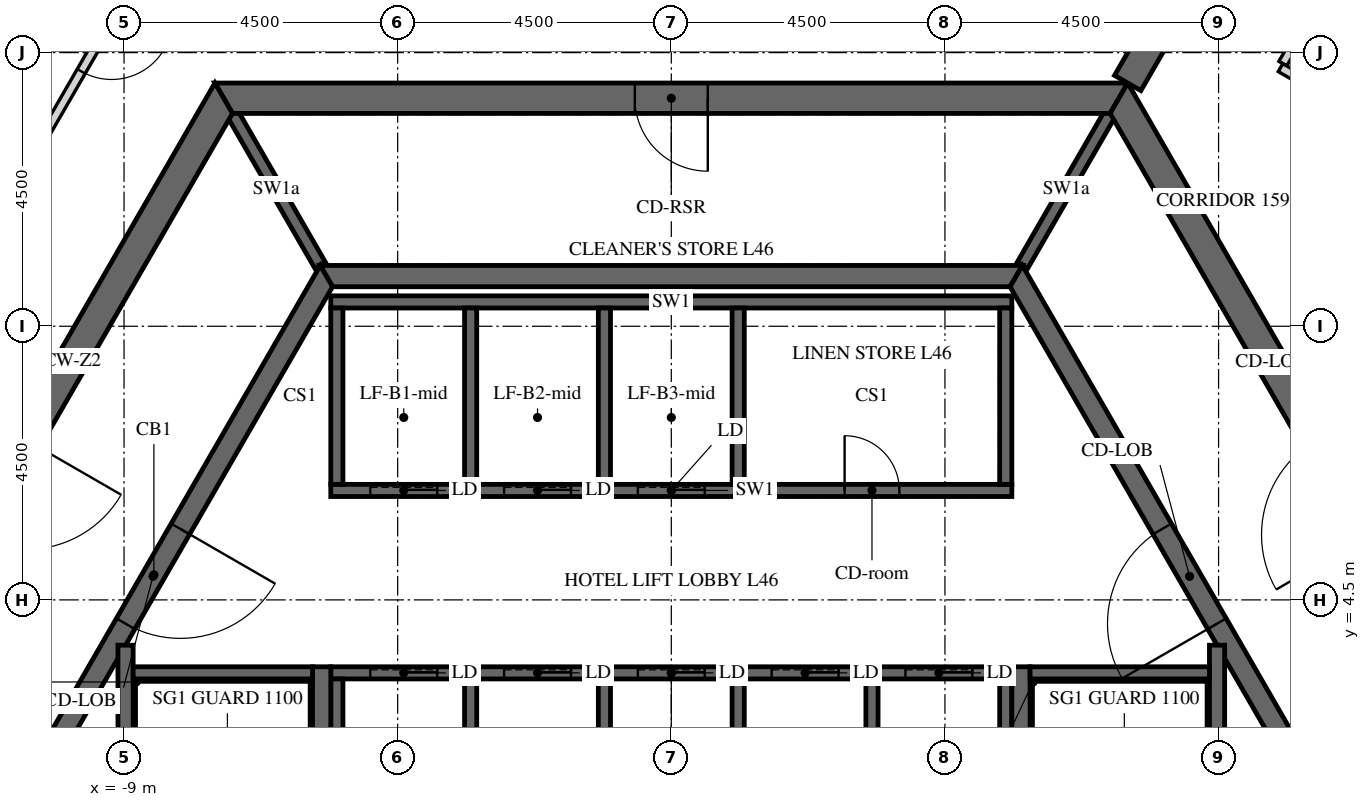
"""IFC4 building model, lengths in metres.
Left out: names, types, materials, properties, quantities, classifications, styles, units other than length and angle.
Written with IfcOpenShell. Run it as: python <this file> out.ifc"""

import sys

from ifc_helpers import new_model, si_unit, direction, frame, frame_2d, origin, place, context, subcontext, project, spatial, polyline, rectangle, outline, extrude, element, fill, save


model = new_model("IFC4")
c1 = context("Model", 3, precision=1e-05, world=origin(), true_north=direction((0.0, 1.0)))
c2 = subcontext(c1, "Body", "Model", "MODEL_VIEW")
j1 = project(units=[si_unit("LENGTHUNIT", "METRE"), si_unit("PLANEANGLEUNIT", "RADIAN")], contexts=[c1])
p1 = place(None, origin())
s1 = spatial("IfcSite", under=j1, at=p1, CompositionType="ELEMENT")
p2 = place(p1, origin())
s2 = spatial("IfcBuilding", under=s1, at=p2, CompositionType="ELEMENT")
p3 = place(p2, frame((0.0, 0.0, 195.6)))
s3 = spatial("IfcBuildingStorey", under=s2, at=p3, CompositionType="ELEMENT", Elevation=195.6)
p4 = place(p3, frame((-7.361, 12.75, -0.15), z_axis=(0.0, 0.0, 1.0), x_axis=(-0.50000571537, -0.866022103989, 0.0)))
e1 = element("IfcWall", 1, at=p4, inside=s3, PredefinedType="SHEAR", context=c2, shape_type="SweptSolid", body=[
    extrude(outline(polyline([(-0.144, -0.25), (14.867, -0.25), (14.578, 0.25), (0.144, 0.25), (-0.144, -0.25)])), origin(), (0.0, 0.0, 1.0), 3.9),
])
p5 = place(p4, frame((6.49, 0.0, 0.15)))
e2 = element("IfcOpeningElement", 2, at=p5, cuts=e1, PredefinedType="OPENING", context=c2, shape_type="SweptSolid", body=[
    extrude(rectangle(XDim=1.8, YDim=2.4, at=frame_2d((0.9, 1.2))), frame((0.0, 0.26, 0.0), z_axis=(0.0, -1.0, 0.0), x_axis=(1.0, 0.0, 0.0)), (0.0, 0.0, 1.0), 0.52),
])
p6 = place(p3, frame((14.722, 0.0, -0.15), z_axis=(0.0, 0.0, 1.0), x_axis=(-0.50000571537, 0.866022103989, 0.0)))
e3 = element("IfcWall", 3, at=p6, inside=s3, PredefinedType="SHEAR", context=c2, shape_type="SweptSolid", body=[
    extrude(outline(polyline([(-0.144, -0.25), (14.867, -0.25), (14.578, 0.25), (0.144, 0.25), (-0.144, -0.25)])), origin(), (0.0, 0.0, 1.0), 3.9),
])
p7 = place(p6, frame((6.432, 0.0, 0.15)))
e4 = element("IfcOpeningElement", 4, at=p7, cuts=e3, PredefinedType="OPENING", context=c2, shape_type="SweptSolid", body=[
    extrude(rectangle(XDim=1.8, YDim=2.4, at=frame_2d((0.9, 1.2))), frame((0.0, 0.26, 0.0), z_axis=(0.0, -1.0, 0.0), x_axis=(1.0, 0.0, 0.0)), (0.0, 0.0, 1.0), 0.52),
])
p8 = place(p3, frame((7.361, 12.75, -0.15), z_axis=(0.0, 0.0, 1.0), x_axis=(-1.0, 0.0, 0.0)))
e5 = element("IfcWall", 5, at=p8, inside=s3, PredefinedType="SHEAR", context=c2, shape_type="SweptSolid", body=[
    extrude(outline(polyline([(-0.144, -0.25), (14.866, -0.25), (14.578, 0.25), (0.144, 0.25), (-0.144, -0.25)])), origin(), (0.0, 0.0, 1.0), 3.9),
])
p9 = place(p8, frame((6.761, 0.0, 0.15)))
e6 = element("IfcOpeningElement", 6, at=p9, cuts=e5, PredefinedType="OPENING", context=c2, shape_type="SweptSolid", body=[
    extrude(rectangle(XDim=1.2, YDim=2.4, at=frame_2d((0.6, 1.2))), frame((0.0, 0.26, 0.0), z_axis=(0.0, -1.0, 0.0), x_axis=(1.0, 0.0, 0.0)), (0.0, 0.0, 1.0), 0.52),
])
p10 = place(p3, frame((7.506, 13.0, -0.15), z_axis=(0.0, 0.0, 1.0), x_axis=(0.499988271576, 0.866032175087, 0.0)))
e7 = element("IfcWall", 7, at=p10, inside=s3, PredefinedType="SHEAR", context=c2, shape_type="SweptSolid", body=[
    extrude(rectangle(XDim=15.424, YDim=0.5, at=frame_2d((7.712, 0.0))), origin(), (0.0, 0.0, 1.0), 3.9),
])
p11 = place(p10, frame((6.812, 0.0, 0.15)))
e8 = element("IfcOpeningElement", 8, at=p11, cuts=e7, PredefinedType="OPENING", context=c2, shape_type="SweptSolid", body=[
    extrude(rectangle(XDim=1.8, YDim=2.4, at=frame_2d((0.9, 1.2))), frame((0.0, 0.26, 0.0), z_axis=(0.0, -1.0, 0.0), x_axis=(1.0, 0.0, 0.0)), (0.0, 0.0, 1.0), 0.52),
])
p12 = place(p3, frame((-5.673, 9.825, -0.15), z_axis=(0.0, 0.0, 1.0), x_axis=(-0.499995046907, -0.866028263435, 0.0)))
e9 = element("IfcWall", 9, at=p12, inside=s3, PredefinedType="SHEAR", context=c2, shape_type="SweptSolid", body=[
    extrude(outline(polyline([(-0.101, -0.175), (11.446, -0.175), (11.244, 0.175), (0.101, 0.175), (-0.101, -0.175)])), origin(), (0.0, 0.0, 1.0), 3.9),
])
p13 = place(p12, frame((4.801, 0.0, 0.15)))
e10 = element("IfcOpeningElement", 10, at=p13, cuts=e9, PredefinedType="OPENING", context=c2, shape_type="SweptSolid", body=[
    extrude(rectangle(XDim=1.8, YDim=2.4, at=frame_2d((0.9, 1.2))), frame((0.0, 0.185, 0.0), z_axis=(0.0, -1.0, 0.0), x_axis=(1.0, 0.0, 0.0)), (0.0, 0.0, 1.0), 0.37),
])
p14 = place(p3, frame((11.345, 0.0, -0.15), z_axis=(0.0, 0.0, 1.0), x_axis=(-0.499995046907, 0.866028263435, 0.0)))
e11 = element("IfcWall", 11, at=p14, inside=s3, PredefinedType="SHEAR", context=c2, shape_type="SweptSolid", body=[
    extrude(outline(polyline([(-0.101, -0.175), (11.446, -0.175), (11.244, 0.175), (0.101, 0.175), (-0.101, -0.175)])), origin(), (0.0, 0.0, 1.0), 3.9),
])
p15 = place(p14, frame((4.744, 0.0, 0.15)))
e12 = element("IfcOpeningElement", 12, at=p15, cuts=e11, PredefinedType="OPENING", context=c2, shape_type="SweptSolid", body=[
    extrude(rectangle(XDim=1.8, YDim=2.4, at=frame_2d((0.9, 1.2))), frame((0.0, 0.185, 0.0), z_axis=(0.0, -1.0, 0.0), x_axis=(1.0, 0.0, 0.0)), (0.0, 0.0, 1.0), 0.37),
])
p16 = place(p3, frame((5.673, 9.825, -0.15), z_axis=(0.0, 0.0, 1.0), x_axis=(-1.0, 0.0, 0.0)))
e13 = element("IfcWall", 13, at=p16, inside=s3, PredefinedType="SHEAR", context=c2, shape_type="SweptSolid", body=[
    extrude(outline(polyline([(-0.101, -0.175), (11.446, -0.175), (11.244, 0.175), (0.101, 0.175), (-0.101, -0.175)])), origin(), (0.0, 0.0, 1.0), 3.9),
])
p17 = place(p3, frame((-5.6, 6.3, -0.25), z_axis=(0.0, 0.0, 1.0), x_axis=(1.0, 0.0, 0.0)))
e14 = element("IfcWall", 14, at=p17, inside=s3, PredefinedType="SHEAR", context=c2, shape_type="SweptSolid", body=[
    extrude(rectangle(XDim=11.2, YDim=0.2, at=frame_2d((5.6, 0.0))), origin(), (0.0, 0.0, 1.0), 3.9),
])
p18 = place(p17, frame((8.45, 0.0, 0.25)))
e15 = element("IfcOpeningElement", 15, at=p18, cuts=e14, PredefinedType="OPENING", context=c2, shape_type="SweptSolid", body=[
    extrude(rectangle(XDim=0.9, YDim=2.1, at=frame_2d((0.45, 1.05))), frame((0.0, 0.11, 0.0), z_axis=(0.0, -1.0, 0.0), x_axis=(1.0, 0.0, 0.0)), (0.0, 0.0, 1.0), 0.22),
])
p19 = place(p17, frame((0.65, 0.0, 0.25)))
e16 = element("IfcOpeningElement", 16, at=p19, cuts=e14, PredefinedType="OPENING", context=c2, shape_type="SweptSolid", body=[
    extrude(rectangle(XDim=1.1, YDim=2.1, at=frame_2d((0.55, 1.05))), frame((0.0, 0.11, 0.0), z_axis=(0.0, -1.0, 0.0), x_axis=(1.0, 0.0, 0.0)), (0.0, 0.0, 1.0), 0.22),
])
p20 = place(p17, frame((2.85, 0.0, 0.25)))
e17 = element("IfcOpeningElement", 17, at=p20, cuts=e14, PredefinedType="OPENING", context=c2, shape_type="SweptSolid", body=[
    extrude(rectangle(XDim=1.1, YDim=2.1, at=frame_2d((0.55, 1.05))), frame((0.0, 0.11, 0.0), z_axis=(0.0, -1.0, 0.0), x_axis=(1.0, 0.0, 0.0)), (0.0, 0.0, 1.0), 0.22),
])
p21 = place(p17, frame((5.05, 0.0, 0.25)))
e18 = element("IfcOpeningElement", 18, at=p21, cuts=e14, PredefinedType="OPENING", context=c2, shape_type="SweptSolid", body=[
    extrude(rectangle(XDim=1.1, YDim=2.1, at=frame_2d((0.55, 1.05))), frame((0.0, 0.11, 0.0), z_axis=(0.0, -1.0, 0.0), x_axis=(1.0, 0.0, 0.0)), (0.0, 0.0, 1.0), 0.22),
])
p22 = place(p3, frame((-5.6, 9.4, -0.25), z_axis=(0.0, 0.0, 1.0), x_axis=(1.0, 0.0, 0.0)))
e19 = element("IfcWall", 19, at=p22, inside=s3, PredefinedType="SHEAR", context=c2, shape_type="SweptSolid", body=[
    extrude(rectangle(XDim=11.2, YDim=0.2, at=frame_2d((5.6, 0.0))), origin(), (0.0, 0.0, 1.0), 3.9),
])
for number, where, z_axis, x_axis in (
    (20, (-5.5, 6.4, -0.25), (0.0, 0.0, 1.0), (0.0, 1.0, 0.0)),
    (21, (-3.3, 6.4, -0.25), (0.0, 0.0, 1.0), (0.0, 1.0, 0.0)),
    (22, (-1.1, 6.4, -0.25), (0.0, 0.0, 1.0), (0.0, 1.0, 0.0)),
    (23, (1.1, 6.4, -0.25), (0.0, 0.0, 1.0), (0.0, 1.0, 0.0)),
    (24, (5.5, 6.4, -0.25), (0.0, 0.0, 1.0), (0.0, 1.0, 0.0)),
):
    element("IfcWall", number, at=place(p3, frame(where, z_axis=z_axis, x_axis=x_axis)), inside=s3, PredefinedType="SHEAR", context=c2, shape_type="SweptSolid", body=[
        extrude(rectangle(XDim=2.9, YDim=0.2, at=frame_2d((1.45, 0.0))), origin(), (0.0, 0.0, 1.0), 3.9),
    ])
p23 = place(p3, frame((-5.6, 3.3, -0.25), z_axis=(0.0, 0.0, 1.0), x_axis=(1.0, 0.0, 0.0)))
e25 = element("IfcWall", 25, at=p23, inside=s3, PredefinedType="SHEAR", context=c2, shape_type="SweptSolid", body=[
    extrude(rectangle(XDim=11.2, YDim=0.2, at=frame_2d((5.6, 0.0))), origin(), (0.0, 0.0, 1.0), 3.9),
])
p24 = place(p23, frame((0.65, 0.0, 0.25)))
e26 = element("IfcOpeningElement", 26, at=p24, cuts=e25, PredefinedType="OPENING", context=c2, shape_type="SweptSolid", body=[
    extrude(rectangle(XDim=1.1, YDim=2.1, at=frame_2d((0.55, 1.05))), frame((0.0, 0.11, 0.0), z_axis=(0.0, -1.0, 0.0), x_axis=(1.0, 0.0, 0.0)), (0.0, 0.0, 1.0), 0.22),
])
p25 = place(p23, frame((2.85, 0.0, 0.25)))
e27 = element("IfcOpeningElement", 27, at=p25, cuts=e25, PredefinedType="OPENING", context=c2, shape_type="SweptSolid", body=[
    extrude(rectangle(XDim=1.1, YDim=2.1, at=frame_2d((0.55, 1.05))), frame((0.0, 0.11, 0.0), z_axis=(0.0, -1.0, 0.0), x_axis=(1.0, 0.0, 0.0)), (0.0, 0.0, 1.0), 0.22),
])
p26 = place(p23, frame((5.05, 0.0, 0.25)))
e28 = element("IfcOpeningElement", 28, at=p26, cuts=e25, PredefinedType="OPENING", context=c2, shape_type="SweptSolid", body=[
    extrude(rectangle(XDim=1.1, YDim=2.1, at=frame_2d((0.55, 1.05))), frame((0.0, 0.11, 0.0), z_axis=(0.0, -1.0, 0.0), x_axis=(1.0, 0.0, 0.0)), (0.0, 0.0, 1.0), 0.22),
])
p27 = place(p23, frame((7.25, 0.0, 0.25)))
e29 = element("IfcOpeningElement", 29, at=p27, cuts=e25, PredefinedType="OPENING", context=c2, shape_type="SweptSolid", body=[
    extrude(rectangle(XDim=1.1, YDim=2.1, at=frame_2d((0.55, 1.05))), frame((0.0, 0.11, 0.0), z_axis=(0.0, -1.0, 0.0), x_axis=(1.0, 0.0, 0.0)), (0.0, 0.0, 1.0), 0.22),
])
p28 = place(p23, frame((9.45, 0.0, 0.25)))
e30 = element("IfcOpeningElement", 30, at=p28, cuts=e25, PredefinedType="OPENING", context=c2, shape_type="SweptSolid", body=[
    extrude(rectangle(XDim=1.1, YDim=2.1, at=frame_2d((0.55, 1.05))), frame((0.0, 0.11, 0.0), z_axis=(0.0, -1.0, 0.0), x_axis=(1.0, 0.0, 0.0)), (0.0, 0.0, 1.0), 0.22),
])
for number, where, z_axis, x_axis in (
    (31, (-5.5, 0.1, -0.25), (0.0, 0.0, 1.0), (0.0, 1.0, 0.0)),
    (32, (-3.3, 0.1, -0.25), (0.0, 0.0, 1.0), (0.0, 1.0, 0.0)),
    (33, (-1.1, 0.1, -0.25), (0.0, 0.0, 1.0), (0.0, 1.0, 0.0)),
    (34, (1.1, 0.1, -0.25), (0.0, 0.0, 1.0), (0.0, 1.0, 0.0)),
    (35, (3.3, 0.1, -0.25), (0.0, 0.0, 1.0), (0.0, 1.0, 0.0)),
    (36, (5.5, 0.1, -0.25), (0.0, 0.0, 1.0), (0.0, 1.0, 0.0)),
):
    element("IfcWall", number, at=place(p3, frame(where, z_axis=z_axis, x_axis=x_axis)), inside=s3, PredefinedType="SHEAR", context=c2, shape_type="SweptSolid", body=[
        extrude(rectangle(XDim=3.1, YDim=0.2, at=frame_2d((1.55, 0.0))), origin(), (0.0, 0.0, 1.0), 3.9),
    ])
for number, where, z_axis, x_axis in (
    (37, (5.773, 10.0, -0.15), (0.0, 0.0, 1.0), (0.5, 0.866, 0.0)),
    (38, (-5.773, 10.0, -0.15), (0.0, 0.0, 1.0), (-0.5, 0.866, 0.0)),
):
    element("IfcWall", number, at=place(p3, frame(where, z_axis=z_axis, x_axis=x_axis)), inside=s3, PredefinedType="SHEAR", context=c2, shape_type="SweptSolid", body=[
        extrude(rectangle(XDim=2.887, YDim=0.2, at=frame_2d((1.443, 0.0))), origin(), (0.0, 0.0, 1.0), 3.9),
    ])
p29 = place(p3, frame((5.75, -3.4, -0.25), z_axis=(0.0, 0.0, 1.0), x_axis=(0.0, 1.0, 0.0)))
e39 = element("IfcWall", 39, at=p29, inside=s3, PredefinedType="SHEAR", context=c2, shape_type="SweptSolid", body=[
    extrude(rectangle(XDim=6.8, YDim=0.3, at=frame_2d((3.4, 0.0))), origin(), (0.0, 0.0, 1.0), 3.9),
])
p30 = place(p3, frame((8.975, -3.755, -0.25), z_axis=(0.0, 0.0, 1.0), x_axis=(0.0, 1.0, 0.0)))
e40 = element("IfcWall", 40, at=p30, inside=s3, PredefinedType="SHEAR", context=c2, shape_type="SweptSolid", body=[
    extrude(rectangle(XDim=7.51, YDim=0.25, at=frame_2d((3.755, 0.0))), origin(), (0.0, 0.0, 1.0), 3.9),
])
p31 = place(p3, frame((5.9, 3.3, -0.25), z_axis=(0.0, 0.0, 1.0), x_axis=(1.0, 0.0, 0.0)))
e41 = element("IfcWall", 41, at=p31, inside=s3, PredefinedType="SHEAR", context=c2, shape_type="SweptSolid", body=[
    extrude(rectangle(XDim=2.95, YDim=0.2, at=frame_2d((1.475, 0.0))), origin(), (0.0, 0.0, 1.0), 3.9),
])
p32 = place(p3, frame((-5.75, -3.4, -0.25), z_axis=(0.0, 0.0, 1.0), x_axis=(0.0, 1.0, 0.0)))
e42 = element("IfcWall", 42, at=p32, inside=s3, PredefinedType="SHEAR", context=c2, shape_type="SweptSolid", body=[
    extrude(rectangle(XDim=6.8, YDim=0.3, at=frame_2d((3.4, 0.0))), origin(), (0.0, 0.0, 1.0), 3.9),
])
p33 = place(p3, frame((-8.975, -3.755, -0.25), z_axis=(0.0, 0.0, 1.0), x_axis=(0.0, 1.0, 0.0)))
e43 = element("IfcWall", 43, at=p33, inside=s3, PredefinedType="SHEAR", context=c2, shape_type="SweptSolid", body=[
    extrude(rectangle(XDim=7.51, YDim=0.25, at=frame_2d((3.755, 0.0))), origin(), (0.0, 0.0, 1.0), 3.9),
])
p34 = place(p3, frame((-8.85, 3.3, -0.25), z_axis=(0.0, 0.0, 1.0), x_axis=(1.0, 0.0, 0.0)))
e44 = element("IfcWall", 44, at=p34, inside=s3, PredefinedType="SHEAR", context=c2, shape_type="SweptSolid", body=[
    extrude(rectangle(XDim=2.95, YDim=0.2, at=frame_2d((1.475, 0.0))), origin(), (0.0, 0.0, 1.0), 3.9),
])
p35 = place(p3, frame((-8.704, 14.925, 0.0), z_axis=(0.0, 0.0, 1.0), x_axis=(-0.500001272756, -0.866024668957, 0.0)))
e45 = element("IfcWall", 45, at=p35, inside=s3, PredefinedType="PARTITIONING", context=c2, shape_type="SweptSolid", body=[
    extrude(rectangle(XDim=14.78, YDim=0.15, at=frame_2d((7.39, 0.0))), origin(), (0.0, 0.0, 1.0), 2.988),
])
p36 = place(p35, frame((1.001, 0.0, 0.0)))
e46 = element("IfcOpeningElement", 46, at=p36, cuts=e45, PredefinedType="OPENING", context=c2, shape_type="SweptSolid", body=[
    extrude(rectangle(XDim=1.0, YDim=2.1, at=frame_2d((0.5, 1.05))), frame((0.0, 0.085, 0.0), z_axis=(0.0, -1.0, 0.0), x_axis=(1.0, 0.0, 0.0)), (0.0, 0.0, 1.0), 0.17),
])
p37 = place(p35, frame((7.281, 0.0, 0.0)))
e47 = element("IfcOpeningElement", 47, at=p37, cuts=e45, PredefinedType="OPENING", context=c2, shape_type="SweptSolid", body=[
    extrude(rectangle(XDim=1.0, YDim=2.1, at=frame_2d((0.5, 1.05))), frame((0.0, 0.085, 0.0), z_axis=(0.0, -1.0, 0.0), x_axis=(1.0, 0.0, 0.0)), (0.0, 0.0, 1.0), 0.17),
])
p38 = place(p3, frame((10.056, 13.318, 0.0), z_axis=(0.0, 0.0, 1.0), x_axis=(0.499995202058, 0.86602817386, 0.0)))
e48 = element("IfcWall", 48, at=p38, inside=s3, PredefinedType="PARTITIONING", context=c2, shape_type="SweptSolid", body=[
    extrude(rectangle(XDim=7.361, YDim=0.15, at=frame_2d((3.68, 0.0))), origin(), (0.0, 0.0, 1.0), 2.988),
])
p39 = place(p38, frame((4.168, 0.0, 0.0)))
e49 = element("IfcOpeningElement", 49, at=p39, cuts=e48, PredefinedType="OPENING", context=c2, shape_type="SweptSolid", body=[
    extrude(rectangle(XDim=1.0, YDim=2.1, at=frame_2d((0.5, 1.05))), frame((0.0, 0.085, 0.0), z_axis=(0.0, -1.0, 0.0), x_axis=(1.0, 0.0, 0.0)), (0.0, 0.0, 1.0), 0.17),
])
p40 = place(p3, frame((11.009, 12.681, 0.0), z_axis=(0.0, 0.0, 1.0), x_axis=(-0.86605406138, 0.499950360304, 0.0)))
e50 = element("IfcWall", 50, at=p40, inside=s3, PredefinedType="PARTITIONING", context=c2, shape_type="SweptSolid", body=[
    extrude(rectangle(XDim=1.144, YDim=0.15, at=frame_2d((0.572, 0.0))), origin(), (0.0, 0.0, 1.0), 2.988),
])
p41 = place(p9, origin())
e51 = element("IfcDoor", 51, at=p41, inside=s3, OperationType="SINGLE_SWING_LEFT", PredefinedType="DOOR", context=c2, shape_type="SweptSolid", body=[
    extrude(rectangle(XDim=1.2, YDim=2.4, at=frame_2d((0.6, 1.2))), frame((0.0, 0.025, 0.0), z_axis=(0.0, -1.0, 0.0), x_axis=(1.0, 0.0, 0.0)), (0.0, 0.0, 1.0), 0.05),
])
fill(e6, e51)
p42 = place(p13, origin())
e52 = element("IfcDoor", 52, at=p42, inside=s3, OperationType="DOUBLE_DOOR_SINGLE_SWING", PredefinedType="DOOR", context=c2, shape_type="SweptSolid", body=[
    extrude(rectangle(XDim=1.8, YDim=2.4, at=frame_2d((0.9, 1.2))), frame((0.0, 0.025, 0.0), z_axis=(0.0, -1.0, 0.0), x_axis=(1.0, 0.0, 0.0)), (0.0, 0.0, 1.0), 0.05),
])
fill(e10, e52)
p43 = place(p15, origin())
e53 = element("IfcDoor", 53, at=p43, inside=s3, OperationType="DOUBLE_DOOR_SINGLE_SWING", PredefinedType="DOOR", context=c2, shape_type="SweptSolid", body=[
    extrude(rectangle(XDim=1.8, YDim=2.4, at=frame_2d((0.9, 1.2))), frame((0.0, 0.025, 0.0), z_axis=(0.0, -1.0, 0.0), x_axis=(1.0, 0.0, 0.0)), (0.0, 0.0, 1.0), 0.05),
])
fill(e12, e53)
p44 = place(p18, origin())
e54 = element("IfcDoor", 54, at=p44, inside=s3, OperationType="SINGLE_SWING_LEFT", PredefinedType="DOOR", context=c2, shape_type="SweptSolid", body=[
    extrude(rectangle(XDim=0.9, YDim=2.1, at=frame_2d((0.45, 1.05))), frame((0.0, 0.025, 0.0), z_axis=(0.0, -1.0, 0.0), x_axis=(1.0, 0.0, 0.0)), (0.0, 0.0, 1.0), 0.05),
])
fill(e15, e54)
p45 = place(p19, origin())
e55 = element("IfcDoor", 55, at=p45, inside=s3, OperationType="SLIDING_TO_LEFT", PredefinedType="DOOR", context=c2, shape_type="SweptSolid", body=[
    extrude(rectangle(XDim=1.1, YDim=2.1, at=frame_2d((0.55, 1.05))), frame((0.0, 0.025, 0.0), z_axis=(0.0, -1.0, 0.0), x_axis=(1.0, 0.0, 0.0)), (0.0, 0.0, 1.0), 0.05),
])
fill(e16, e55)
p46 = place(p20, origin())
e56 = element("IfcDoor", 56, at=p46, inside=s3, OperationType="SLIDING_TO_LEFT", PredefinedType="DOOR", context=c2, shape_type="SweptSolid", body=[
    extrude(rectangle(XDim=1.1, YDim=2.1, at=frame_2d((0.55, 1.05))), frame((0.0, 0.025, 0.0), z_axis=(0.0, -1.0, 0.0), x_axis=(1.0, 0.0, 0.0)), (0.0, 0.0, 1.0), 0.05),
])
fill(e17, e56)
p47 = place(p21, origin())
e57 = element("IfcDoor", 57, at=p47, inside=s3, OperationType="SLIDING_TO_LEFT", PredefinedType="DOOR", context=c2, shape_type="SweptSolid", body=[
    extrude(rectangle(XDim=1.1, YDim=2.1, at=frame_2d((0.55, 1.05))), frame((0.0, 0.025, 0.0), z_axis=(0.0, -1.0, 0.0), x_axis=(1.0, 0.0, 0.0)), (0.0, 0.0, 1.0), 0.05),
])
fill(e18, e57)
p48 = place(p24, origin())
e58 = element("IfcDoor", 58, at=p48, inside=s3, OperationType="SLIDING_TO_LEFT", PredefinedType="DOOR", context=c2, shape_type="SweptSolid", body=[
    extrude(rectangle(XDim=1.1, YDim=2.1, at=frame_2d((0.55, 1.05))), frame((0.0, 0.025, 0.0), z_axis=(0.0, -1.0, 0.0), x_axis=(1.0, 0.0, 0.0)), (0.0, 0.0, 1.0), 0.05),
])
fill(e26, e58)
p49 = place(p25, origin())
e59 = element("IfcDoor", 59, at=p49, inside=s3, OperationType="SLIDING_TO_LEFT", PredefinedType="DOOR", context=c2, shape_type="SweptSolid", body=[
    extrude(rectangle(XDim=1.1, YDim=2.1, at=frame_2d((0.55, 1.05))), frame((0.0, 0.025, 0.0), z_axis=(0.0, -1.0, 0.0), x_axis=(1.0, 0.0, 0.0)), (0.0, 0.0, 1.0), 0.05),
])
fill(e27, e59)
p50 = place(p26, origin())
e60 = element("IfcDoor", 60, at=p50, inside=s3, OperationType="SLIDING_TO_LEFT", PredefinedType="DOOR", context=c2, shape_type="SweptSolid", body=[
    extrude(rectangle(XDim=1.1, YDim=2.1, at=frame_2d((0.55, 1.05))), frame((0.0, 0.025, 0.0), z_axis=(0.0, -1.0, 0.0), x_axis=(1.0, 0.0, 0.0)), (0.0, 0.0, 1.0), 0.05),
])
fill(e28, e60)
p51 = place(p27, origin())
e61 = element("IfcDoor", 61, at=p51, inside=s3, OperationType="SLIDING_TO_LEFT", PredefinedType="DOOR", context=c2, shape_type="SweptSolid", body=[
    extrude(rectangle(XDim=1.1, YDim=2.1, at=frame_2d((0.55, 1.05))), frame((0.0, 0.025, 0.0), z_axis=(0.0, -1.0, 0.0), x_axis=(1.0, 0.0, 0.0)), (0.0, 0.0, 1.0), 0.05),
])
fill(e29, e61)
p52 = place(p28, origin())
e62 = element("IfcDoor", 62, at=p52, inside=s3, OperationType="SLIDING_TO_LEFT", PredefinedType="DOOR", context=c2, shape_type="SweptSolid", body=[
    extrude(rectangle(XDim=1.1, YDim=2.1, at=frame_2d((0.55, 1.05))), frame((0.0, 0.025, 0.0), z_axis=(0.0, -1.0, 0.0), x_axis=(1.0, 0.0, 0.0)), (0.0, 0.0, 1.0), 0.05),
])
fill(e30, e62)
p53 = place(p36, origin())
e63 = element("IfcDoor", 63, at=p53, inside=s3, OperationType="SINGLE_SWING_RIGHT", PredefinedType="DOOR", context=c2, shape_type="SweptSolid", body=[
    extrude(rectangle(XDim=1.0, YDim=2.1, at=frame_2d((0.5, 1.05))), frame((0.0, 0.025, 0.0), z_axis=(0.0, -1.0, 0.0), x_axis=(1.0, 0.0, 0.0)), (0.0, 0.0, 1.0), 0.05),
])
fill(e46, e63)
save(model, sys.argv[1])
